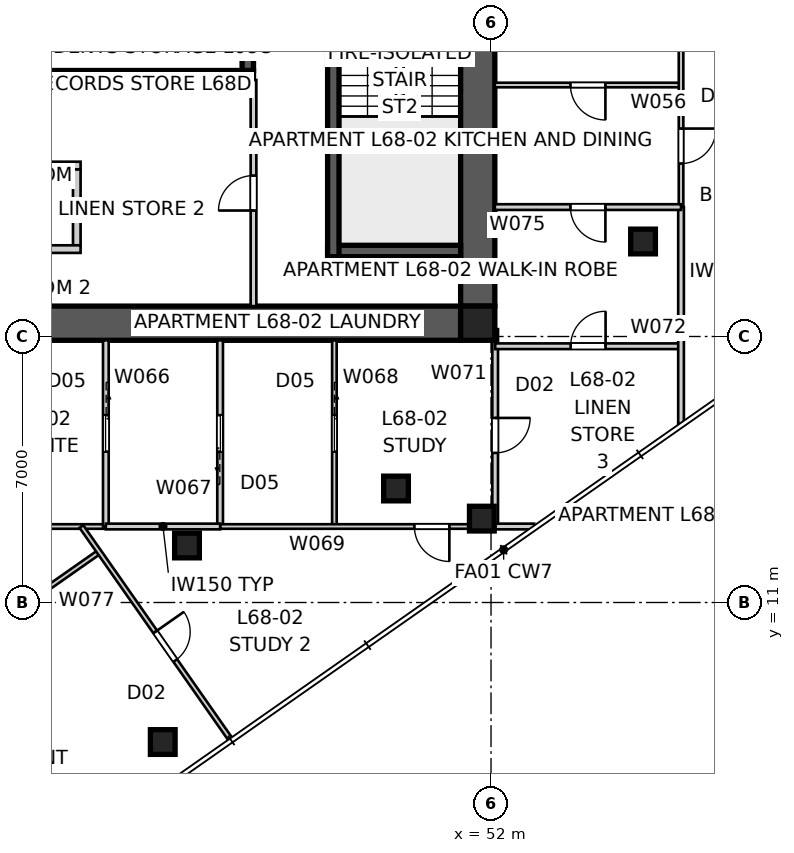
"""IFC4 building model, lengths in metres.
Left out: names, types, materials, properties, quantities, classifications, styles, units other than length and angle.
Written with IfcOpenShell. Run it as: python <this file> out.ifc"""

import sys

from ifc_helpers import new_model, si_unit, direction, frame, frame_2d, origin, origin_2d, place, context, subcontext, project, spatial, polyline, rectangle, outline, extrude, element, fill, save


model = new_model("IFC4")
c1 = context("Model", 3, precision=1e-05, world=origin(), true_north=direction((0.0, 1.0)))
c2 = subcontext(c1, "Body", "Model", "MODEL_VIEW")
j1 = project(units=[si_unit("LENGTHUNIT", "METRE"), si_unit("PLANEANGLEUNIT", "RADIAN")], contexts=[c1])
p1 = place(None, origin())
s1 = spatial("IfcSite", under=j1, at=p1, CompositionType="ELEMENT")
p2 = place(p1, origin())
s2 = spatial("IfcBuilding", under=s1, at=p2, CompositionType="ELEMENT")
p3 = place(p2, frame((0.0, 0.0, 247.2)))
s3 = spatial("IfcBuildingStorey", under=s2, at=p3, CompositionType="ELEMENT", Elevation=247.2)
p4 = place(p3, frame((51.2, 18.35, 0.0), z_axis=(0.0, 0.0, 1.0), x_axis=(-1.0, 0.0, 0.0)))
e1 = element("IfcWall", 1, at=p4, inside=s3, PredefinedType="SHEAR", context=c2, shape_type="SweptSolid", body=[
    extrude(outline(polyline([(0.0, -0.45), (22.4, -0.45), (22.4, -0.025), (22.85, -0.025), (22.85, 0.025), (22.4, 0.025), (22.4, 0.45), (0.0, 0.45), (0.0, 0.025), (-0.45, 0.025), (-0.45, -0.025), (0.0, -0.025), (0.0, -0.45)])), origin(), (0.0, 0.0, 1.0), 3.4),
])
p5 = place(p3, frame((51.65, 18.8, 0.0), z_axis=(0.0, 0.0, 1.0), x_axis=(0.0, 1.0, 0.0)))
e2 = element("IfcWall", 2, at=p5, inside=s3, PredefinedType="SHEAR", context=c2, shape_type="SweptSolid", body=[
    extrude(outline(polyline([(0.0, -0.45), (22.4, -0.45), (22.4, -0.025), (22.85, -0.025), (22.85, 0.025), (22.4, 0.025), (22.4, 0.45), (0.0, 0.45), (0.0, 0.025), (-0.45, 0.025), (-0.45, -0.025), (0.0, -0.025), (0.0, -0.45)])), origin(), (0.0, 0.0, 1.0), 3.4),
])
p6 = place(p5, frame((11.14, 0.0, 0.0)))
e3 = element("IfcOpeningElement", 3, at=p6, cuts=e2, PredefinedType="OPENING", context=c2, shape_type="SweptSolid", body=[
    extrude(rectangle(XDim=1.02, YDim=2.4, at=frame_2d((0.51, 1.2))), frame((0.0, 0.46, 0.0), z_axis=(0.0, -1.0, 0.0), x_axis=(1.0, 0.0, 0.0)), (0.0, 0.0, 1.0), 0.92),
])
p7 = place(p3, frame((45.75, 24.85, 0.0), z_axis=(0.0, 0.0, 1.0), x_axis=(-1.0, 0.0, 0.0)))
e4 = element("IfcWall", 4, at=p7, inside=s3, PredefinedType="SHEAR", context=c2, shape_type="SweptSolid", body=[
    extrude(rectangle(XDim=11.5, YDim=0.3, at=frame_2d((5.75, 0.0))), origin(), (0.0, 0.0, 1.0), 3.4),
])
p8 = place(p3, frame((45.6, 27.8, 0.0), z_axis=(0.0, 0.0, 1.0), x_axis=(0.0, -1.0, 0.0)))
e5 = element("IfcWall", 5, at=p8, inside=s3, PredefinedType="SHEAR", context=c2, shape_type="SweptSolid", body=[
    extrude(rectangle(XDim=2.8, YDim=0.3, at=frame_2d((1.4, 0.0))), origin(), (0.0, 0.0, 1.0), 3.4),
])
p9 = place(p3, frame((47.85, 27.8, 0.0), z_axis=(0.0, 0.0, 1.0), x_axis=(0.0, -1.0, 0.0)))
e6 = element("IfcWall", 6, at=p9, inside=s3, PredefinedType="SHEAR", context=c2, shape_type="SweptSolid", body=[
    extrude(rectangle(XDim=7.7, YDim=0.3, at=frame_2d((3.85, 0.0))), origin(), (0.0, 0.0, 1.0), 3.4),
])
p10 = place(p3, frame((51.2, 20.25, 0.0), z_axis=(0.0, 0.0, 1.0), x_axis=(-1.0, 0.0, 0.0)))
e7 = element("IfcWall", 7, at=p10, inside=s3, PredefinedType="SHEAR", context=c2, shape_type="SweptSolid", body=[
    extrude(rectangle(XDim=3.5, YDim=0.3, at=frame_2d((1.75, 0.0))), origin(), (0.0, 0.0, 1.0), 3.4),
])
p11 = place(p3, frame((41.1, 22.4, 0.0), z_axis=(0.0, 0.0, 1.0), x_axis=(0.0, -1.0, 0.0)))
e8 = element("IfcWall", 8, at=p11, inside=s3, PredefinedType="SOLIDWALL", context=c2, shape_type="SweptSolid", body=[
    extrude(rectangle(XDim=2.0, YDim=0.2, at=frame_2d((1.0, 0.0))), origin(), (0.0, 0.0, 1.0), 3.4),
])
for number, where, z_axis, x_axis in (
    (9, (38.8, 22.5, 0.0), (0.0, 0.0, 1.0), (1.0, 0.0, 0.0)),
    (10, (38.8, 20.3, 0.0), (0.0, 0.0, 1.0), (1.0, 0.0, 0.0)),
):
    element("IfcWall", number, at=place(p3, frame(where, z_axis=z_axis, x_axis=x_axis)), inside=s3, PredefinedType="SOLIDWALL", context=c2, shape_type="SweptSolid", body=[
        extrude(rectangle(XDim=2.4, YDim=0.2, at=frame_2d((1.2, 0.0))), origin(), (0.0, 0.0, 1.0), 3.4),
    ])
p12 = place(p3, frame((51.65, 18.35, 0.0), z_axis=(0.0, 0.0, 1.0), x_axis=(1.0, 0.0, 0.0)))
e11 = element("IfcColumn", 11, at=p12, inside=s3, PredefinedType="COLUMN", context=c2, shape_type="SweptSolid", body=[
    extrude(rectangle(XDim=0.9, YDim=0.9, at=origin_2d()), origin(), (0.0, 0.0, 1.0), 3.4),
])
for number, where, z_axis, x_axis in (
    (12, (43.362, 7.328, 0.0), (0.0, 0.0, 1.0), (1.0, 0.0, 0.0)),
    (13, (51.758, 13.207, 0.0), (0.0, 0.0, 1.0), (1.0, 0.0, 0.0)),
    (14, (44.0, 12.5, 0.0), (0.0, 0.0, 1.0), (1.0, 0.0, 0.0)),
    (15, (49.5, 14.0, 0.0), (0.0, 0.0, 1.0), (1.0, 0.0, 0.0)),
    (16, (56.0, 20.5, 0.0), (0.0, 0.0, 1.0), (1.0, 0.0, 0.0)),
):
    element("IfcColumn", number, at=place(p3, frame(where, z_axis=z_axis, x_axis=x_axis)), inside=s3, PredefinedType="COLUMN", context=c2, shape_type="SweptSolid", body=[
        extrude(rectangle(XDim=0.65, YDim=0.65, at=origin_2d()), origin(), (0.0, 0.0, 1.0), 3.4),
    ])
p13 = place(p3, frame((45.75, 18.8, 0.0), z_axis=(0.0, 0.0, 1.0), x_axis=(0.0, 1.0, 0.0)))
e17 = element("IfcWall", 17, at=p13, inside=s3, PredefinedType="SOLIDWALL", context=c2, shape_type="SweptSolid", body=[
    extrude(rectangle(XDim=5.95, YDim=0.15, at=frame_2d((2.975, 0.0))), origin(), (0.0, 0.0, 1.0), 3.25),
])
p14 = place(p13, frame((2.515, 0.0, 0.0)))
e18 = element("IfcOpeningElement", 18, at=p14, cuts=e17, PredefinedType="OPENING", context=c2, shape_type="SweptSolid", body=[
    extrude(rectangle(XDim=0.92, YDim=2.1, at=frame_2d((0.46, 1.05))), frame((0.0, 0.085, 0.0), z_axis=(0.0, -1.0, 0.0), x_axis=(1.0, 0.0, 0.0)), (0.0, 0.0, 1.0), 0.17),
])
p15 = place(p3, frame((57.0, 24.618, 0.0), z_axis=(0.0, 0.0, 1.0), x_axis=(-1.0, 0.0, 0.0)))
e19 = element("IfcWall", 19, at=p15, inside=s3, PredefinedType="PARTITIONING", context=c2, shape_type="SweptSolid", body=[
    extrude(rectangle(XDim=4.9, YDim=0.12, at=frame_2d((2.45, 0.0))), origin(), (0.0, 0.0, 1.0), 3.25),
])
p16 = place(p15, frame((1.99, 0.0, 0.0)))
e20 = element("IfcOpeningElement", 20, at=p16, cuts=e19, PredefinedType="OPENING", context=c2, shape_type="SweptSolid", body=[
    extrude(rectangle(XDim=0.92, YDim=2.34, at=frame_2d((0.46, 1.17))), frame((0.0, 0.07, 0.0), z_axis=(0.0, -1.0, 0.0), x_axis=(1.0, 0.0, 0.0)), (0.0, 0.0, 1.0), 0.14),
])
p17 = place(p3, frame((57.0, 41.904, 0.0), z_axis=(0.0, 0.0, 1.0), x_axis=(0.0, -1.0, 0.0)))
e21 = element("IfcWall", 21, at=p17, inside=s3, PredefinedType="PARTITIONING", context=c2, shape_type="SweptSolid", body=[
    extrude(rectangle(XDim=20.498, YDim=0.12, at=frame_2d((10.249, 0.0))), origin(), (0.0, 0.0, 1.0), 2.55),
])
p18 = place(p17, frame((8.449, 0.0, 0.0)))
e22 = element("IfcOpeningElement", 22, at=p18, cuts=e21, PredefinedType="OPENING", context=c2, shape_type="SweptSolid", body=[
    extrude(rectangle(XDim=0.92, YDim=2.34, at=frame_2d((0.46, 1.17))), frame((0.0, 0.07, 0.0), z_axis=(0.0, -1.0, 0.0), x_axis=(1.0, 0.0, 0.0)), (0.0, 0.0, 1.0), 0.14),
])
p19 = place(p17, frame((11.574, 0.0, 0.0)))
e23 = element("IfcOpeningElement", 23, at=p19, cuts=e21, PredefinedType="OPENING", context=c2, shape_type="SweptSolid", body=[
    extrude(rectangle(XDim=0.92, YDim=2.34, at=frame_2d((0.46, 1.17))), frame((0.0, 0.07, 0.0), z_axis=(0.0, -1.0, 0.0), x_axis=(1.0, 0.0, 0.0)), (0.0, 0.0, 1.0), 0.14),
])
p20 = place(p17, frame((18.432, 0.0, 0.0)))
e24 = element("IfcOpeningElement", 24, at=p20, cuts=e21, PredefinedType="OPENING", context=c2, shape_type="SweptSolid", body=[
    extrude(rectangle(XDim=0.92, YDim=2.34, at=frame_2d((0.46, 1.17))), frame((0.0, 0.07, 0.0), z_axis=(0.0, -1.0, 0.0), x_axis=(1.0, 0.0, 0.0)), (0.0, 0.0, 1.0), 0.14),
])
p21 = place(p3, frame((41.865, 13.0, 0.0), z_axis=(0.0, 0.0, 1.0), x_axis=(-1.0, 0.0, 0.0)))
e25 = element("IfcWall", 25, at=p21, inside=s3, PredefinedType="PARTITIONING", context=c2, shape_type="SweptSolid", body=[
    extrude(rectangle(XDim=10.11, YDim=0.12, at=frame_2d((5.055, 0.0))), origin(), (0.0, 0.0, 1.0), 2.55),
])
p22 = place(p3, frame((41.865, 17.9, 0.0), z_axis=(0.0, 0.0, 1.0), x_axis=(0.0, -1.0, 0.0)))
e26 = element("IfcWall", 26, at=p22, inside=s3, PredefinedType="SOLIDWALL", context=c2, shape_type="SweptSolid", body=[
    extrude(rectangle(XDim=4.9, YDim=0.15, at=frame_2d((2.45, 0.0))), origin(), (0.0, 0.0, 1.0), 3.25),
])
p23 = place(p22, frame((1.97, 0.0, 0.0)))
e27 = element("IfcOpeningElement", 27, at=p23, cuts=e26, PredefinedType="OPENING", context=c2, shape_type="SweptSolid", body=[
    extrude(rectangle(XDim=0.96, YDim=2.1, at=frame_2d((0.48, 1.05))), frame((0.0, 0.085, 0.0), z_axis=(0.0, -1.0, 0.0), x_axis=(1.0, 0.0, 0.0)), (0.0, 0.0, 1.0), 0.17),
])
p24 = place(p3, frame((44.871, 13.0, 0.0), z_axis=(0.0, 0.0, 1.0), x_axis=(0.0, 1.0, 0.0)))
e28 = element("IfcWall", 28, at=p24, inside=s3, PredefinedType="SOLIDWALL", context=c2, shape_type="SweptSolid", body=[
    extrude(rectangle(XDim=4.9, YDim=0.15, at=frame_2d((2.45, 0.0))), origin(), (0.0, 0.0, 1.0), 3.25),
])
p25 = place(p24, frame((1.97, 0.0, 0.0)))
e29 = element("IfcOpeningElement", 29, at=p25, cuts=e28, PredefinedType="OPENING", context=c2, shape_type="SweptSolid", body=[
    extrude(rectangle(XDim=0.96, YDim=2.1, at=frame_2d((0.48, 1.05))), frame((0.0, 0.085, 0.0), z_axis=(0.0, -1.0, 0.0), x_axis=(1.0, 0.0, 0.0)), (0.0, 0.0, 1.0), 0.17),
])
p26 = place(p3, frame((47.878, 17.9, 0.0), z_axis=(0.0, 0.0, 1.0), x_axis=(0.0, -1.0, 0.0)))
e30 = element("IfcWall", 30, at=p26, inside=s3, PredefinedType="PARTITIONING", context=c2, shape_type="SweptSolid", body=[
    extrude(rectangle(XDim=4.9, YDim=0.12, at=frame_2d((2.45, 0.0))), origin(), (0.0, 0.0, 1.0), 3.25),
])
p27 = place(p26, frame((1.97, 0.0, 0.0)))
e31 = element("IfcOpeningElement", 31, at=p27, cuts=e30, PredefinedType="OPENING", context=c2, shape_type="SweptSolid", body=[
    extrude(rectangle(XDim=0.96, YDim=2.1, at=frame_2d((0.48, 1.05))), frame((0.0, 0.07, 0.0), z_axis=(0.0, -1.0, 0.0), x_axis=(1.0, 0.0, 0.0)), (0.0, 0.0, 1.0), 0.14),
])
p28 = place(p3, frame((52.109, 13.0, 0.0), z_axis=(0.0, 0.0, 1.0), x_axis=(-1.0, 0.0, 0.0)))
e32 = element("IfcWall", 32, at=p28, inside=s3, PredefinedType="PARTITIONING", context=c2, shape_type="SweptSolid", body=[
    extrude(rectangle(XDim=7.238, YDim=0.12, at=frame_2d((3.619, 0.0))), origin(), (0.0, 0.0, 1.0), 2.55),
])
p29 = place(p28, frame((1.205, 0.0, 0.0)))
e33 = element("IfcOpeningElement", 33, at=p29, cuts=e32, PredefinedType="OPENING", context=c2, shape_type="SweptSolid", body=[
    extrude(rectangle(XDim=0.92, YDim=2.34, at=frame_2d((0.46, 1.17))), frame((0.0, 0.07, 0.0), z_axis=(0.0, -1.0, 0.0), x_axis=(1.0, 0.0, 0.0)), (0.0, 0.0, 1.0), 0.14),
])
p30 = place(p3, frame((44.871, 13.0, 0.0), z_axis=(0.0, 0.0, 1.0), x_axis=(-1.0, 0.0, 0.0)))
e34 = element("IfcWall", 34, at=p30, inside=s3, PredefinedType="SOLIDWALL", context=c2, shape_type="SweptSolid", body=[
    extrude(rectangle(XDim=3.007, YDim=0.15, at=frame_2d((1.503, 0.0))), origin(), (0.0, 0.0, 1.0), 3.25),
])
p31 = place(p3, frame((52.109, 18.194, 0.0), z_axis=(0.0, 0.0, 1.0), x_axis=(0.0, -1.0, 0.0)))
e35 = element("IfcWall", 35, at=p31, inside=s3, PredefinedType="SOLIDWALL", context=c2, shape_type="SweptSolid", body=[
    extrude(rectangle(XDim=5.194, YDim=0.15, at=frame_2d((2.597, 0.0))), origin(), (0.0, 0.0, 1.0), 3.25),
])
p32 = place(p31, frame((2.337, 0.0, 0.0)))
e36 = element("IfcOpeningElement", 36, at=p32, cuts=e35, PredefinedType="OPENING", context=c2, shape_type="SweptSolid", body=[
    extrude(rectangle(XDim=0.92, YDim=2.34, at=frame_2d((0.46, 1.17))), frame((0.0, 0.085, 0.0), z_axis=(0.0, -1.0, 0.0), x_axis=(1.0, 0.0, 0.0)), (0.0, 0.0, 1.0), 0.17),
])
p33 = place(p3, frame((52.109, 17.743, 0.0), z_axis=(0.0, 0.0, 1.0), x_axis=(1.0, 0.0, 0.0)))
e37 = element("IfcWall", 37, at=p33, inside=s3, PredefinedType="SOLIDWALL", context=c2, shape_type="SweptSolid", body=[
    extrude(rectangle(XDim=4.891, YDim=0.15, at=frame_2d((2.446, 0.0))), origin(), (0.0, 0.0, 1.0), 3.25),
])
p34 = place(p33, frame((1.986, 0.0, 0.0)))
e38 = element("IfcOpeningElement", 38, at=p34, cuts=e37, PredefinedType="OPENING", context=c2, shape_type="SweptSolid", body=[
    extrude(rectangle(XDim=0.92, YDim=2.34, at=frame_2d((0.46, 1.17))), frame((0.0, 0.085, 0.0), z_axis=(0.0, -1.0, 0.0), x_axis=(1.0, 0.0, 0.0)), (0.0, 0.0, 1.0), 0.17),
])
p35 = place(p3, frame((57.0, 21.406, 0.0), z_axis=(0.0, 0.0, 1.0), x_axis=(0.0, -1.0, 0.0)))
e39 = element("IfcWall", 39, at=p35, inside=s3, PredefinedType="SOLIDWALL", context=c2, shape_type="SweptSolid", body=[
    extrude(rectangle(XDim=5.7, YDim=0.15, at=frame_2d((2.85, 0.0))), origin(), (0.0, 0.0, 1.0), 3.25),
])
p36 = place(p3, frame((53.136, 13.0, 0.0), z_axis=(0.0, 0.0, 1.0), x_axis=(-1.0, 0.0, 0.0)))
e40 = element("IfcWall", 40, at=p36, inside=s3, PredefinedType="SOLIDWALL", context=c2, shape_type="SweptSolid", body=[
    extrude(rectangle(XDim=1.027, YDim=0.15, at=frame_2d((0.513, 0.0))), origin(), (0.0, 0.0, 1.0), 3.25),
])
p37 = place(p3, frame((57.0, 21.406, 0.0), z_axis=(0.0, 0.0, 1.0), x_axis=(-1.0, 0.0, 0.0)))
e41 = element("IfcWall", 41, at=p37, inside=s3, PredefinedType="SOLIDWALL", context=c2, shape_type="SweptSolid", body=[
    extrude(rectangle(XDim=4.9, YDim=0.15, at=frame_2d((2.45, 0.0))), origin(), (0.0, 0.0, 1.0), 3.25),
])
p38 = place(p37, frame((1.99, 0.0, 0.0)))
e42 = element("IfcOpeningElement", 42, at=p38, cuts=e41, PredefinedType="OPENING", context=c2, shape_type="SweptSolid", body=[
    extrude(rectangle(XDim=0.92, YDim=2.34, at=frame_2d((0.46, 1.17))), frame((0.0, 0.085, 0.0), z_axis=(0.0, -1.0, 0.0), x_axis=(1.0, 0.0, 0.0)), (0.0, 0.0, 1.0), 0.17),
])
p39 = place(p3, frame((31.279, 5.04, 0.0), z_axis=(0.0, 0.0, 1.0), x_axis=(0.819155207289, 0.573571919092, 0.0)))
e43 = element("IfcWall", 43, at=p39, inside=s3, PredefinedType="PARTITIONING", context=c2, shape_type="SweptSolid", body=[
    extrude(rectangle(XDim=12.71, YDim=0.12, at=frame_2d((6.355, 0.0))), origin(), (0.0, 0.0, 1.0), 2.717),
])
p40 = place(p39, frame((5.875, 0.0, 0.0)))
e44 = element("IfcOpeningElement", 44, at=p40, cuts=e43, PredefinedType="OPENING", context=c2, shape_type="SweptSolid", body=[
    extrude(rectangle(XDim=0.92, YDim=2.34, at=frame_2d((0.46, 1.17))), frame((0.0, 0.07, 0.0), z_axis=(0.0, -1.0, 0.0), x_axis=(1.0, 0.0, 0.0)), (0.0, 0.0, 1.0), 0.14),
])
p41 = place(p3, frame((41.222, 13.0, 0.0), z_axis=(0.0, 0.0, 1.0), x_axis=(0.57357503053, -0.819153028653, 0.0)))
e45 = element("IfcWall", 45, at=p41, inside=s3, PredefinedType="PARTITIONING", context=c2, shape_type="SweptSolid", body=[
    extrude(rectangle(XDim=6.834, YDim=0.12, at=frame_2d((3.417, 0.0))), origin(), (0.0, 0.0, 1.0), 3.25),
])
p42 = place(p41, frame((3.386, 0.0, 0.0)))
e46 = element("IfcOpeningElement", 46, at=p42, cuts=e45, PredefinedType="OPENING", context=c2, shape_type="SweptSolid", body=[
    extrude(rectangle(XDim=0.92, YDim=2.34, at=frame_2d((0.46, 1.17))), frame((0.0, 0.07, 0.0), z_axis=(0.0, -1.0, 0.0), x_axis=(1.0, 0.0, 0.0)), (0.0, 0.0, 1.0), 0.14),
])
p43 = place(p3, frame((57.0, 28.604, 0.0), z_axis=(0.0, 0.0, 1.0), x_axis=(0.573575545802, -0.819152667857, 0.0)))
e47 = element("IfcWall", 47, at=p43, inside=s3, PredefinedType="PARTITIONING", context=c2, shape_type="SweptSolid", body=[
    extrude(rectangle(XDim=10.566, YDim=0.12, at=frame_2d((5.283, 0.0))), origin(), (0.0, 0.0, 1.0), 3.25),
])
p44 = place(p43, frame((8.121, 0.0, 0.0)))
e48 = element("IfcOpeningElement", 48, at=p44, cuts=e47, PredefinedType="OPENING", context=c2, shape_type="SweptSolid", body=[
    extrude(rectangle(XDim=0.92, YDim=2.34, at=frame_2d((0.46, 1.17))), frame((0.0, 0.07, 0.0), z_axis=(0.0, -1.0, 0.0), x_axis=(1.0, 0.0, 0.0)), (0.0, 0.0, 1.0), 0.14),
])
p45 = place(p14, origin())
e49 = element("IfcDoor", 49, at=p45, inside=s3, OperationType="SINGLE_SWING_LEFT", PredefinedType="DOOR", context=c2, shape_type="SweptSolid", body=[
    extrude(rectangle(XDim=0.92, YDim=2.1, at=frame_2d((0.46, 1.05))), frame((0.0, 0.025, 0.0), z_axis=(0.0, -1.0, 0.0), x_axis=(1.0, 0.0, 0.0)), (0.0, 0.0, 1.0), 0.05),
])
fill(e18, e49)
p46 = place(p16, origin())
e50 = element("IfcDoor", 50, at=p46, inside=s3, OperationType="SINGLE_SWING_LEFT", PredefinedType="DOOR", context=c2, shape_type="SweptSolid", body=[
    extrude(rectangle(XDim=0.92, YDim=2.34, at=frame_2d((0.46, 1.17))), frame((0.0, 0.025, 0.0), z_axis=(0.0, -1.0, 0.0), x_axis=(1.0, 0.0, 0.0)), (0.0, 0.0, 1.0), 0.05),
])
fill(e20, e50)
p47 = place(p38, origin())
e51 = element("IfcDoor", 51, at=p47, inside=s3, OperationType="SINGLE_SWING_LEFT", PredefinedType="DOOR", context=c2, shape_type="SweptSolid", body=[
    extrude(rectangle(XDim=0.92, YDim=2.34, at=frame_2d((0.46, 1.17))), frame((0.0, 0.025, 0.0), z_axis=(0.0, -1.0, 0.0), x_axis=(1.0, 0.0, 0.0)), (0.0, 0.0, 1.0), 0.05),
])
fill(e42, e51)
p48 = place(p20, origin())
e52 = element("IfcDoor", 52, at=p48, inside=s3, OperationType="SINGLE_SWING_LEFT", PredefinedType="DOOR", context=c2, shape_type="SweptSolid", body=[
    extrude(rectangle(XDim=0.92, YDim=2.34, at=frame_2d((0.46, 1.17))), frame((0.0, 0.025, 0.0), z_axis=(0.0, -1.0, 0.0), x_axis=(1.0, 0.0, 0.0)), (0.0, 0.0, 1.0), 0.05),
])
fill(e24, e52)
p49 = place(p34, origin())
e53 = element("IfcDoor", 53, at=p49, inside=s3, OperationType="SINGLE_SWING_RIGHT", PredefinedType="DOOR", context=c2, shape_type="SweptSolid", body=[
    extrude(rectangle(XDim=0.92, YDim=2.34, at=frame_2d((0.46, 1.17))), frame((0.0, 0.025, 0.0), z_axis=(0.0, -1.0, 0.0), x_axis=(1.0, 0.0, 0.0)), (0.0, 0.0, 1.0), 0.05),
])
fill(e38, e53)
p50 = place(p32, origin())
e54 = element("IfcDoor", 54, at=p50, inside=s3, OperationType="SINGLE_SWING_LEFT", PredefinedType="DOOR", context=c2, shape_type="SweptSolid", body=[
    extrude(rectangle(XDim=0.92, YDim=2.34, at=frame_2d((0.46, 1.17))), frame((0.0, 0.025, 0.0), z_axis=(0.0, -1.0, 0.0), x_axis=(1.0, 0.0, 0.0)), (0.0, 0.0, 1.0), 0.05),
])
fill(e36, e54)
p51 = place(p27, origin())
e55 = element("IfcDoor", 55, at=p51, inside=s3, OperationType="SLIDING_TO_LEFT", PredefinedType="DOOR", context=c2, shape_type="SweptSolid", body=[
    extrude(rectangle(XDim=0.96, YDim=2.1, at=frame_2d((0.48, 1.05))), frame((0.0, 0.025, 0.0), z_axis=(0.0, -1.0, 0.0), x_axis=(1.0, 0.0, 0.0)), (0.0, 0.0, 1.0), 0.05),
])
fill(e31, e55)
p52 = place(p29, origin())
e56 = element("IfcDoor", 56, at=p52, inside=s3, OperationType="SINGLE_SWING_LEFT", PredefinedType="DOOR", context=c2, shape_type="SweptSolid", body=[
    extrude(rectangle(XDim=0.92, YDim=2.34, at=frame_2d((0.46, 1.17))), frame((0.0, 0.025, 0.0), z_axis=(0.0, -1.0, 0.0), x_axis=(1.0, 0.0, 0.0)), (0.0, 0.0, 1.0), 0.05),
])
fill(e33, e56)
p53 = place(p25, origin())
e57 = element("IfcDoor", 57, at=p53, inside=s3, OperationType="SLIDING_TO_LEFT", PredefinedType="DOOR", context=c2, shape_type="SweptSolid", body=[
    extrude(rectangle(XDim=0.96, YDim=2.1, at=frame_2d((0.48, 1.05))), frame((0.0, 0.025, 0.0), z_axis=(0.0, -1.0, 0.0), x_axis=(1.0, 0.0, 0.0)), (0.0, 0.0, 1.0), 0.05),
])
fill(e29, e57)
p54 = place(p42, origin())
e58 = element("IfcDoor", 58, at=p54, inside=s3, OperationType="SINGLE_SWING_LEFT", PredefinedType="DOOR", context=c2, shape_type="SweptSolid", body=[
    extrude(rectangle(XDim=0.92, YDim=2.34, at=frame_2d((0.46, 1.17))), frame((0.0, 0.025, 0.0), z_axis=(0.0, -1.0, 0.0), x_axis=(1.0, 0.0, 0.0)), (0.0, 0.0, 1.0), 0.05),
])
fill(e46, e58)
p55 = place(p23, origin())
e59 = element("IfcDoor", 59, at=p55, inside=s3, OperationType="SLIDING_TO_LEFT", PredefinedType="DOOR", context=c2, shape_type="SweptSolid", body=[
    extrude(rectangle(XDim=0.96, YDim=2.1, at=frame_2d((0.48, 1.05))), frame((0.0, 0.025, 0.0), z_axis=(0.0, -1.0, 0.0), x_axis=(1.0, 0.0, 0.0)), (0.0, 0.0, 1.0), 0.05),
])
fill(e27, e59)
save(model, sys.argv[1])
